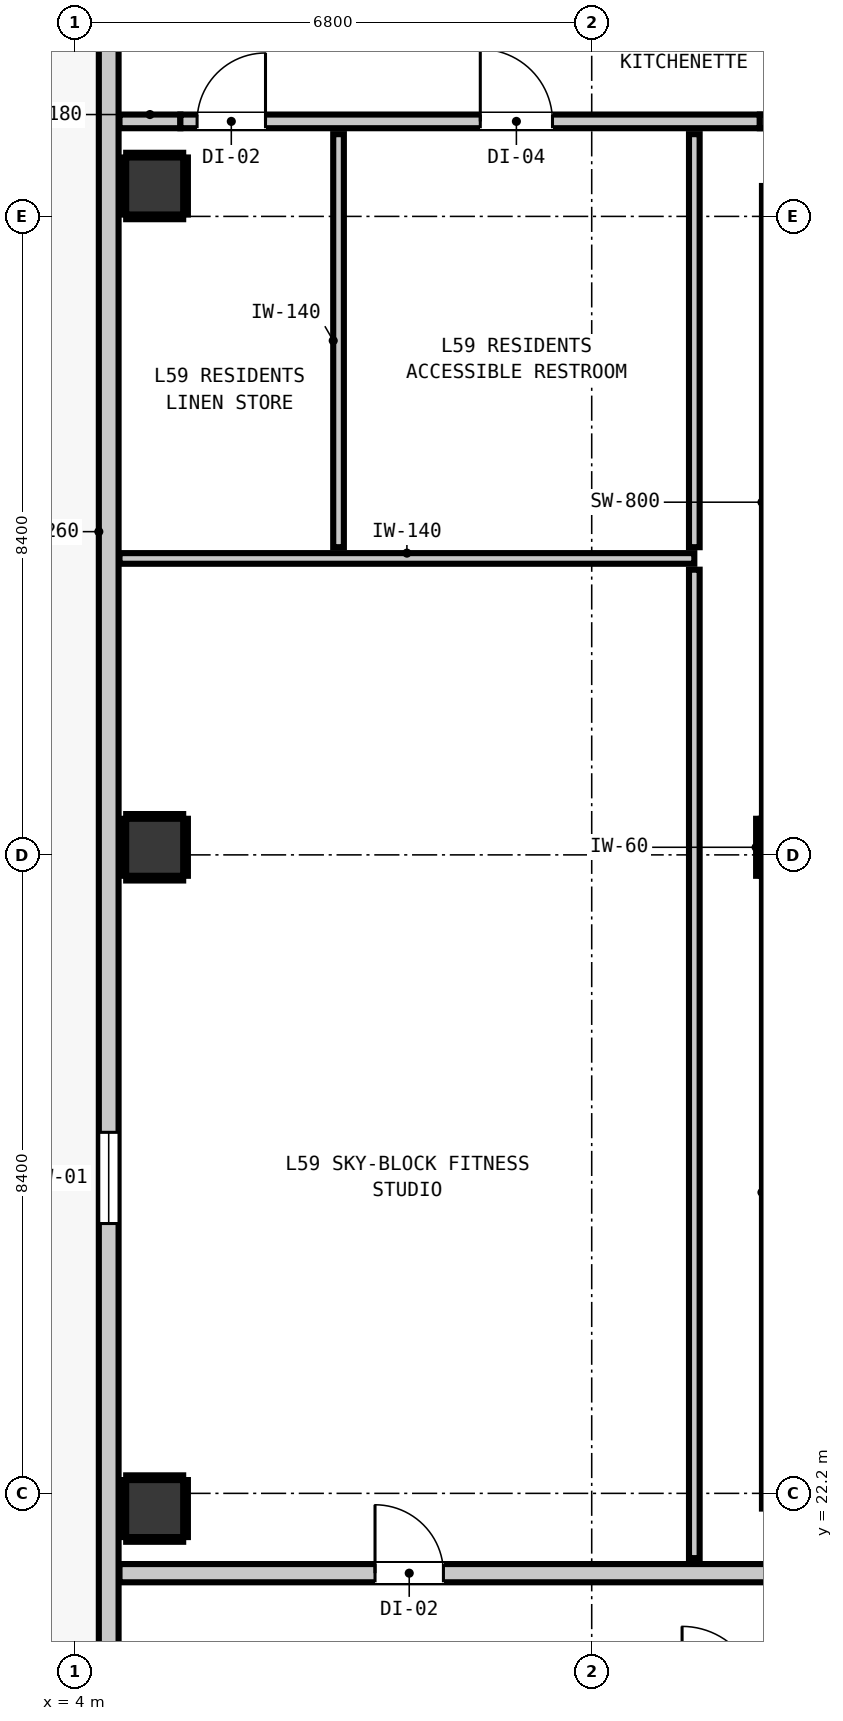
"""IFC4 building model, lengths in metres.
Left out: names, types, materials, properties, quantities, classifications, styles, units other than length and angle.
Written with IfcOpenShell. Run it as: python <this file> out.ifc"""

import sys

from ifc_helpers import new_model, si_unit, direction, frame, frame_2d, origin, origin_2d, place, context, subcontext, project, spatial, rectangle, extrude, element, fill, save


model = new_model("IFC4")
c1 = context("Model", 3, precision=1e-05, world=origin(), true_north=direction((0.0, 1.0)))
c2 = subcontext(c1, "Body", "Model", "MODEL_VIEW")
j1 = project(units=[si_unit("LENGTHUNIT", "METRE"), si_unit("PLANEANGLEUNIT", "RADIAN")], contexts=[c1])
p1 = place(None, origin())
s1 = spatial("IfcSite", under=j1, at=p1, CompositionType="ELEMENT")
p2 = place(p1, origin())
s2 = spatial("IfcBuilding", under=s1, at=p2, CompositionType="ELEMENT")
p3 = place(p2, frame((0.0, 0.0, 203.44)))
s3 = spatial("IfcBuildingStorey", under=s2, at=p3, CompositionType="ELEMENT", Elevation=203.44)
p4 = place(p3, frame((13.4, 30.7, 0.0), z_axis=(0.0, 0.0, 1.0), x_axis=(1.0, 0.0, 0.0)))
e1 = element("IfcColumn", 1, at=p4, inside=s3, PredefinedType="COLUMN", context=c2, shape_type="SweptSolid", body=[
    extrude(rectangle(XDim=0.75, YDim=0.75, at=origin_2d()), origin(), (0.0, 0.0, 1.0), 3.32),
])
p5 = place(p3, frame((13.44, 22.0, 0.0), z_axis=(0.0, 0.0, 1.0), x_axis=(0.0, 1.0, 0.0)))
e2 = element("IfcWall", 2, at=p5, inside=s3, PredefinedType="SHEAR", context=c2, shape_type="SweptSolid", body=[
    extrude(rectangle(XDim=8.32, YDim=0.8, at=frame_2d((4.16, 0.0))), origin(), (0.0, 0.0, 1.0), 3.32),
])
p6 = place(p3, frame((13.44, 31.08, 0.0), z_axis=(0.0, 0.0, 1.0), x_axis=(0.0, 1.0, 0.0)))
e3 = element("IfcWall", 3, at=p6, inside=s3, PredefinedType="SHEAR", context=c2, shape_type="SweptSolid", body=[
    extrude(rectangle(XDim=8.32, YDim=0.8, at=frame_2d((4.16, 0.0))), origin(), (0.0, 0.0, 1.0), 3.32),
])
for number, where, z_axis, x_axis in (
    (4, (5.05, 22.0, 0.0), (0.0, 0.0, 1.0), (1.0, 0.0, 0.0)),
    (5, (5.05, 30.7, 0.0), (0.0, 0.0, 1.0), (1.0, 0.0, 0.0)),
    (6, (5.05, 39.4, 0.0), (0.0, 0.0, 1.0), (1.0, 0.0, 0.0)),
):
    element("IfcColumn", number, at=place(p3, frame(where, z_axis=z_axis, x_axis=x_axis)), inside=s3, PredefinedType="COLUMN", context=c2, shape_type="SweptSolid", body=[
        extrude(rectangle(XDim=0.75, YDim=0.75, at=origin_2d()), origin(), (0.0, 0.0, 1.0), 3.32),
    ])
p7 = place(p3, frame((4.445, 12.345, 0.0), z_axis=(0.0, 0.0, 1.0), x_axis=(0.0, 1.0, 0.0)))
e7 = element("IfcWall", 7, at=p7, inside=s3, PredefinedType="STANDARD", context=c2, shape_type="SweptSolid", body=[
    extrude(rectangle(XDim=30.31, YDim=0.26, at=frame_2d((15.155, 0.0))), origin(), (0.0, 0.0, 1.0), 3.1),
])
p8 = place(p7, frame((0.91, 0.0, 0.0)))
e8 = element("IfcOpeningElement", 8, at=p8, cuts=e7, PredefinedType="OPENING", context=c2, shape_type="SweptSolid", body=[
    extrude(rectangle(XDim=1.0, YDim=2.15, at=frame_2d((0.5, 1.075))), frame((0.0, 0.14, 0.0), z_axis=(0.0, -1.0, 0.0), x_axis=(1.0, 0.0, 0.0)), (0.0, 0.0, 1.0), 0.28),
])
p9 = place(p7, frame((2.322, 0.0, 0.85)))
e9 = element("IfcOpeningElement", 9, at=p9, cuts=e7, PredefinedType="OPENING", context=c2, shape_type="SweptSolid", body=[
    extrude(rectangle(XDim=0.58, YDim=1.5, at=frame_2d((0.29, 0.75))), frame((0.0, 0.14, 0.0), z_axis=(0.0, -1.0, 0.0), x_axis=(1.0, 0.0, 0.0)), (0.0, 0.0, 1.0), 0.28),
])
p10 = place(p7, frame((13.405, 0.0, 0.85)))
e10 = element("IfcOpeningElement", 10, at=p10, cuts=e7, PredefinedType="OPENING", context=c2, shape_type="SweptSolid", body=[
    extrude(rectangle(XDim=1.2, YDim=1.8, at=frame_2d((0.6, 0.9))), frame((0.0, 0.14, 0.0), z_axis=(0.0, -1.0, 0.0), x_axis=(1.0, 0.0, 0.0)), (0.0, 0.0, 1.0), 0.28),
])
p11 = place(p3, frame((4.587, 21.15, 0.0), z_axis=(0.0, 0.0, 1.0), x_axis=(1.0, 0.0, 0.0)))
e11 = element("IfcWall", 11, at=p11, inside=s3, PredefinedType="PARTITIONING", context=c2, shape_type="SweptSolid", body=[
    extrude(rectangle(XDim=36.626, YDim=0.24, at=frame_2d((18.313, 0.0))), origin(), (0.0, 0.0, 1.0), 3.1),
])
p12 = place(p11, frame((13.623, 0.0, 0.0)))
e12 = element("IfcOpeningElement", 12, at=p12, cuts=e11, PredefinedType="OPENING", context=c2, shape_type="SweptSolid", body=[
    extrude(rectangle(XDim=1.1, YDim=2.15, at=frame_2d((0.55, 1.075))), frame((0.0, 0.13, 0.0), z_axis=(0.0, -1.0, 0.0), x_axis=(1.0, 0.0, 0.0)), (0.0, 0.0, 1.0), 0.26),
])
p13 = place(p11, frame((3.362, 0.0, 0.0)))
e13 = element("IfcOpeningElement", 13, at=p13, cuts=e11, PredefinedType="OPENING", context=c2, shape_type="SweptSolid", body=[
    extrude(rectangle(XDim=0.9, YDim=2.1, at=frame_2d((0.45, 1.05))), frame((0.0, 0.13, 0.0), z_axis=(0.0, -1.0, 0.0), x_axis=(1.0, 0.0, 0.0)), (0.0, 0.0, 1.0), 0.26),
])
p14 = place(p3, frame((4.587, 40.25, 0.0), z_axis=(0.0, 0.0, 1.0), x_axis=(1.0, 0.0, 0.0)))
e14 = element("IfcWall", 14, at=p14, inside=s3, PredefinedType="PARTITIONING", context=c2, shape_type="SweptSolid", body=[
    extrude(rectangle(XDim=0.801, YDim=0.18, at=frame_2d((0.4, 0.0))), origin(), (0.0, 0.0, 1.0), 3.1),
])
p15 = place(p3, frame((5.388, 40.25, 0.0), z_axis=(0.0, 0.0, 1.0), x_axis=(1.0, 0.0, 0.0)))
e15 = element("IfcWall", 15, at=p15, inside=s3, PredefinedType="PARTITIONING", context=c2, shape_type="SweptSolid", body=[
    extrude(rectangle(XDim=7.624, YDim=0.18, at=frame_2d((3.812, 0.0))), origin(), (0.0, 0.0, 1.0), 2.477),
])
p16 = place(p15, frame((0.22, 0.0, 0.0)))
e16 = element("IfcOpeningElement", 16, at=p16, cuts=e15, PredefinedType="OPENING", context=c2, shape_type="SweptSolid", body=[
    extrude(rectangle(XDim=0.9, YDim=2.1, at=frame_2d((0.45, 1.05))), frame((0.0, 0.1, 0.0), z_axis=(0.0, -1.0, 0.0), x_axis=(1.0, 0.0, 0.0)), (0.0, 0.0, 1.0), 0.2),
])
p17 = place(p15, frame((3.946, 0.0, 0.0)))
e17 = element("IfcOpeningElement", 17, at=p17, cuts=e15, PredefinedType="OPENING", context=c2, shape_type="SweptSolid", body=[
    extrude(rectangle(XDim=0.95, YDim=2.1, at=frame_2d((0.475, 1.05))), frame((0.0, 0.1, 0.0), z_axis=(0.0, -1.0, 0.0), x_axis=(1.0, 0.0, 0.0)), (0.0, 0.0, 1.0), 0.2),
])
p18 = place(p3, frame((13.012, 40.25, 0.0), z_axis=(0.0, 0.0, 1.0), x_axis=(1.0, 0.0, 0.0)))
e18 = element("IfcWall", 18, at=p18, inside=s3, PredefinedType="PARTITIONING", context=c2, shape_type="SweptSolid", body=[
    extrude(rectangle(XDim=28.201, YDim=0.18, at=frame_2d((14.101, 0.0))), origin(), (0.0, 0.0, 1.0), 3.1),
])
p19 = place(p18, frame((4.423, 0.0, 0.0)))
e19 = element("IfcOpeningElement", 19, at=p19, cuts=e18, PredefinedType="OPENING", context=c2, shape_type="SweptSolid", body=[
    extrude(rectangle(XDim=1.4, YDim=2.15, at=frame_2d((0.7, 1.075))), frame((0.0, 0.1, 0.0), z_axis=(0.0, -1.0, 0.0), x_axis=(1.0, 0.0, 0.0)), (0.0, 0.0, 1.0), 0.2),
])
p20 = place(p3, frame((4.587, 34.5, 0.0), z_axis=(0.0, 0.0, 1.0), x_axis=(1.0, 0.0, 0.0)))
e20 = element("IfcWall", 20, at=p20, inside=s3, PredefinedType="PARTITIONING", context=c2, shape_type="SweptSolid", body=[
    extrude(rectangle(XDim=7.563, YDim=0.14, at=frame_2d((3.781, 0.0))), origin(), (0.0, 0.0, 1.0), 3.1),
])
p21 = place(p3, frame((7.469, 34.648, 0.0), z_axis=(0.0, 0.0, 1.0), x_axis=(0.0, 1.0, 0.0)))
e21 = element("IfcWall", 21, at=p21, inside=s3, PredefinedType="PARTITIONING", context=c2, shape_type="SweptSolid", body=[
    extrude(rectangle(XDim=5.434, YDim=0.14, at=frame_2d((2.717, 0.0))), origin(), (0.0, 0.0, 1.0), 3.1),
])
p22 = place(p3, frame((12.15, 21.348, 0.0), z_axis=(0.0, 0.0, 1.0), x_axis=(0.0, 1.0, 0.0)))
e22 = element("IfcWall", 22, at=p22, inside=s3, PredefinedType="PARTITIONING", context=c2, shape_type="SweptSolid", body=[
    extrude(rectangle(XDim=13.004, YDim=0.14, at=frame_2d((6.502, 0.0))), origin(), (0.0, 0.0, 1.0), 3.1),
])
p23 = place(p3, frame((12.15, 34.648, 0.0), z_axis=(0.0, 0.0, 1.0), x_axis=(0.0, 1.0, 0.0)))
e23 = element("IfcWall", 23, at=p23, inside=s3, PredefinedType="PARTITIONING", context=c2, shape_type="SweptSolid", body=[
    extrude(rectangle(XDim=5.434, YDim=0.14, at=frame_2d((2.717, 0.0))), origin(), (0.0, 0.0, 1.0), 3.1),
])
for number, where, z_axis, x_axis in (
    (24, (12.993, 30.325, 0.0), (0.0, 0.0, 1.0), (0.0, 1.0, 0.0)),
    (25, (4.675, 21.593, 0.0), (0.0, 0.0, 1.0), (1.0, 0.0, 0.0)),
    (26, (4.675, 22.407, 0.0), (0.0, 0.0, 1.0), (1.0, 0.0, 0.0)),
    (27, (4.643, 21.625, 0.0), (0.0, 0.0, 1.0), (0.0, 1.0, 0.0)),
    (28, (5.457, 21.625, 0.0), (0.0, 0.0, 1.0), (0.0, 1.0, 0.0)),
    (29, (4.675, 30.293, 0.0), (0.0, 0.0, 1.0), (1.0, 0.0, 0.0)),
    (30, (4.675, 31.107, 0.0), (0.0, 0.0, 1.0), (1.0, 0.0, 0.0)),
    (31, (4.643, 30.325, 0.0), (0.0, 0.0, 1.0), (0.0, 1.0, 0.0)),
    (32, (5.457, 30.325, 0.0), (0.0, 0.0, 1.0), (0.0, 1.0, 0.0)),
    (33, (4.675, 38.993, 0.0), (0.0, 0.0, 1.0), (1.0, 0.0, 0.0)),
    (34, (4.675, 39.807, 0.0), (0.0, 0.0, 1.0), (1.0, 0.0, 0.0)),
    (35, (4.643, 39.025, 0.0), (0.0, 0.0, 1.0), (0.0, 1.0, 0.0)),
    (36, (5.457, 39.025, 0.0), (0.0, 0.0, 1.0), (0.0, 1.0, 0.0)),
):
    element("IfcWall", number, at=place(p3, frame(where, z_axis=z_axis, x_axis=x_axis)), inside=s3, PredefinedType="PARTITIONING", context=c2, shape_type="SweptSolid", body=[
        extrude(rectangle(XDim=0.75, YDim=0.06, at=frame_2d((0.375, 0.0))), origin(), (0.0, 0.0, 1.0), 1.45),
    ])
p24 = place(p10, origin())
e37 = element("IfcWindow", 37, at=p24, inside=s3, PartitioningType="SINGLE_PANEL", PredefinedType="WINDOW", context=c2, shape_type="SweptSolid", body=[
    extrude(rectangle(XDim=1.2, YDim=1.8, at=frame_2d((0.6, 0.9))), frame((0.0, 0.03, 0.0), z_axis=(0.0, -1.0, 0.0), x_axis=(1.0, 0.0, 0.0)), (0.0, 0.0, 1.0), 0.06),
])
fill(e10, e37)
p25 = place(p13, origin())
e38 = element("IfcDoor", 38, at=p25, inside=s3, OperationType="SINGLE_SWING_LEFT", PredefinedType="DOOR", context=c2, shape_type="SweptSolid", body=[
    extrude(rectangle(XDim=0.9, YDim=2.1, at=frame_2d((0.45, 1.05))), frame((0.0, 0.025, 0.0), z_axis=(0.0, -1.0, 0.0), x_axis=(1.0, 0.0, 0.0)), (0.0, 0.0, 1.0), 0.05),
])
fill(e13, e38)
p26 = place(p16, origin())
e39 = element("IfcDoor", 39, at=p26, inside=s3, OperationType="SINGLE_SWING_RIGHT", PredefinedType="DOOR", context=c2, shape_type="SweptSolid", body=[
    extrude(rectangle(XDim=0.9, YDim=2.1, at=frame_2d((0.45, 1.05))), frame((0.0, 0.025, 0.0), z_axis=(0.0, -1.0, 0.0), x_axis=(1.0, 0.0, 0.0)), (0.0, 0.0, 1.0), 0.05),
])
fill(e16, e39)
p27 = place(p17, origin())
e40 = element("IfcDoor", 40, at=p27, inside=s3, OperationType="SINGLE_SWING_LEFT", PredefinedType="DOOR", context=c2, shape_type="SweptSolid", body=[
    extrude(rectangle(XDim=0.95, YDim=2.1, at=frame_2d((0.475, 1.05))), frame((0.0, 0.025, 0.0), z_axis=(0.0, -1.0, 0.0), x_axis=(1.0, 0.0, 0.0)), (0.0, 0.0, 1.0), 0.05),
])
fill(e17, e40)
save(model, sys.argv[1])
